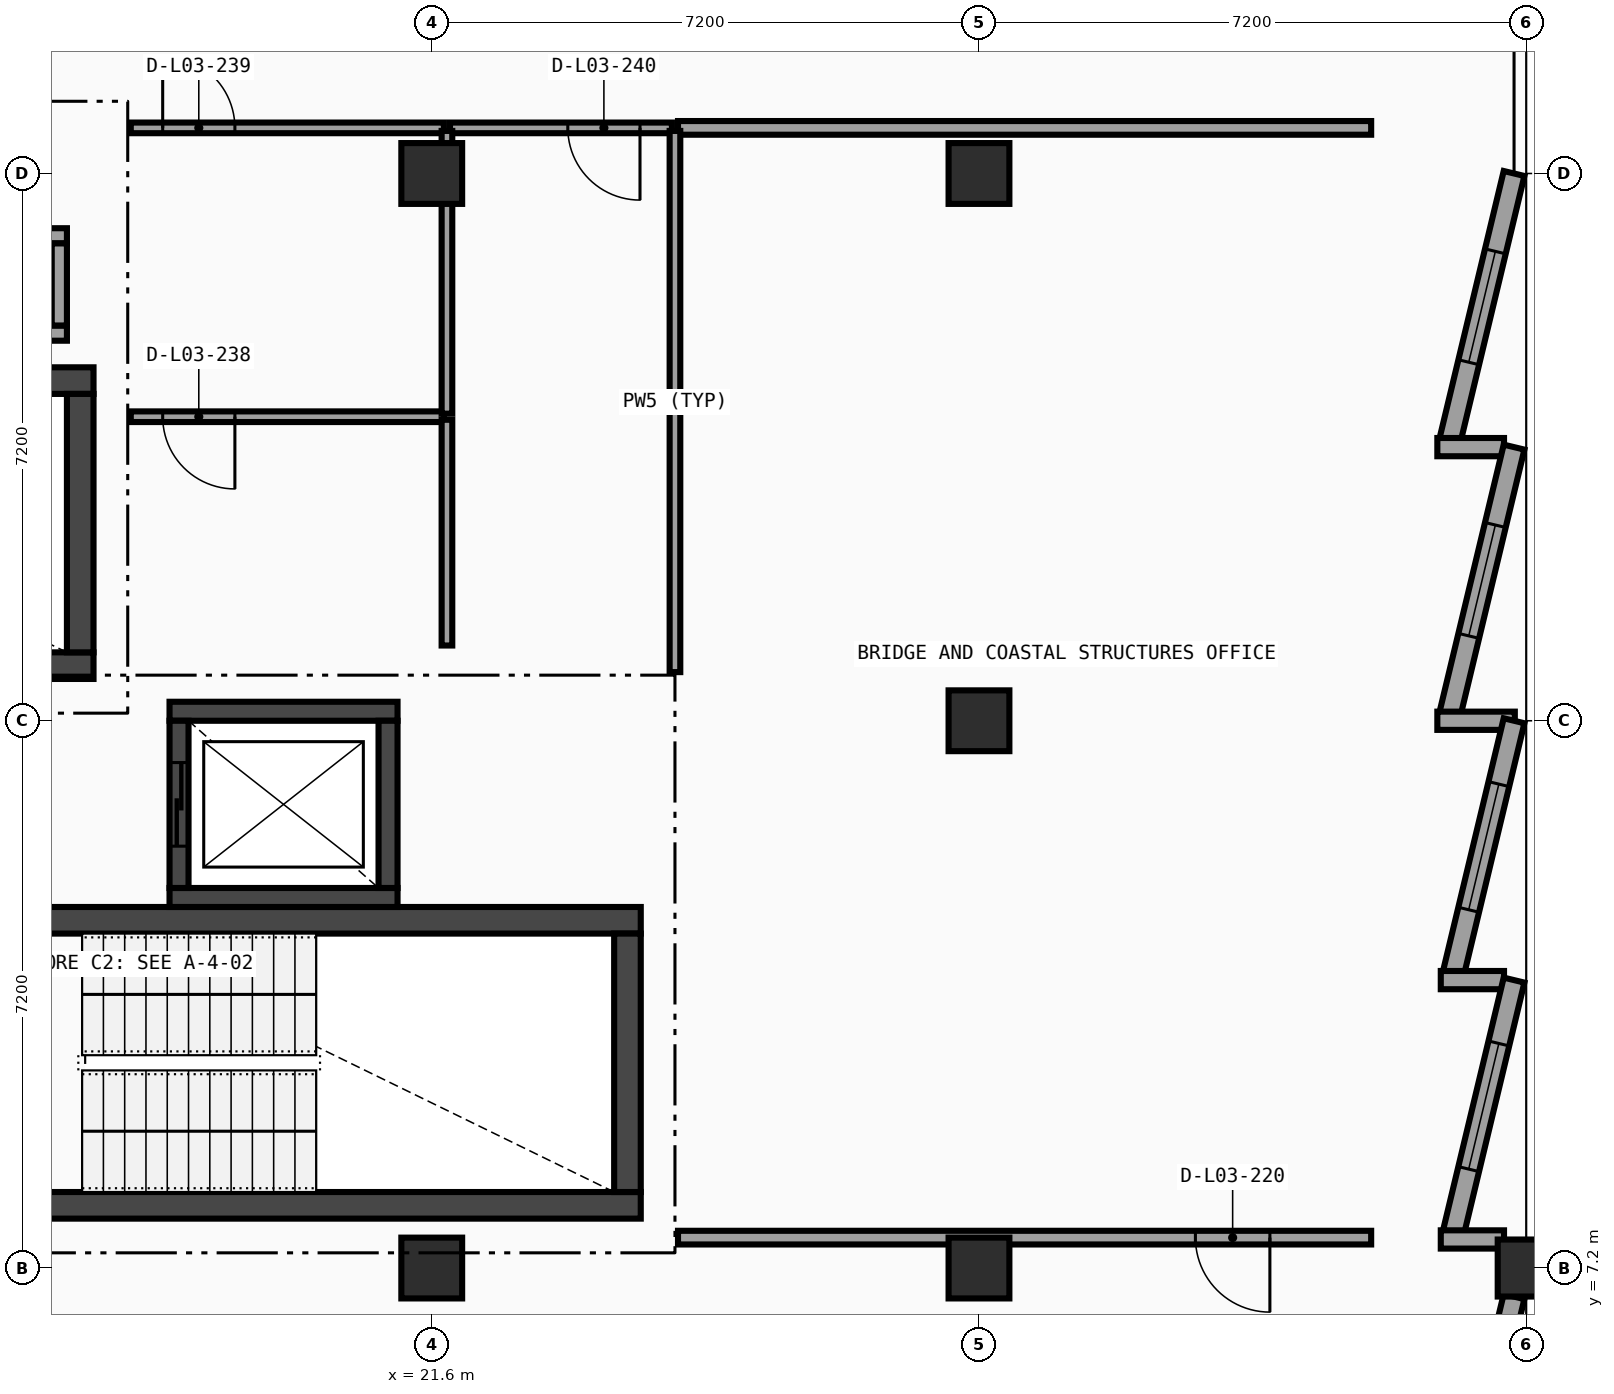
"""IFC4 building model, lengths in metres.
Left out: names, types, materials, properties, quantities, classifications, styles, units other than length and angle.
Written with IfcOpenShell. Run it as: python <this file> out.ifc"""

import sys

from ifc_helpers import new_model, si_unit, direction, frame, frame_2d, origin, origin_2d, place, context, subcontext, project, spatial, rectangle, extrude, element, fill, save


model = new_model("IFC4")
c1 = context("Model", 3, precision=1e-05, world=origin(), true_north=direction((0.0, 1.0)))
c2 = subcontext(c1, "Body", "Model", "MODEL_VIEW")
j1 = project(units=[si_unit("LENGTHUNIT", "METRE"), si_unit("PLANEANGLEUNIT", "RADIAN")], contexts=[c1])
p1 = place(None, origin())
s1 = spatial("IfcSite", under=j1, at=p1, CompositionType="ELEMENT")
p2 = place(p1, origin())
s2 = spatial("IfcBuilding", under=s1, at=p2, CompositionType="ELEMENT")
p3 = place(p2, frame((0.0, 0.0, 14.7)))
s3 = spatial("IfcBuildingStorey", under=s2, at=p3, CompositionType="ELEMENT", Elevation=14.7)
for number, where, z_axis, x_axis in (
    (1, (21.6, 7.2, 0.0), (0.0, 0.0, 1.0), (1.0, 0.0, 0.0)),
    (2, (21.6, 21.6, 0.0), (0.0, 0.0, 1.0), (1.0, 0.0, 0.0)),
    (3, (28.8, 7.2, 0.0), (0.0, 0.0, 1.0), (1.0, 0.0, 0.0)),
    (4, (28.8, 14.4, 0.0), (0.0, 0.0, 1.0), (1.0, 0.0, 0.0)),
    (5, (28.8, 21.6, 0.0), (0.0, 0.0, 1.0), (1.0, 0.0, 0.0)),
):
    element("IfcColumn", number, at=place(p3, frame(where, z_axis=z_axis, x_axis=x_axis)), inside=s3, PredefinedType="COLUMN", context=c2, shape_type="SweptSolid", body=[
        extrude(rectangle(XDim=0.8, YDim=0.8, at=origin_2d()), origin(), (0.0, 0.0, 1.0), 4.2),
    ])
p4 = place(p3, frame((36.0, 7.2, 0.0), z_axis=(0.0, 0.0, 1.0), x_axis=(1.0, 0.0, 0.0)))
e6 = element("IfcColumn", 6, at=p4, inside=s3, PredefinedType="COLUMN", context=c2, shape_type="SweptSolid", body=[
    extrude(rectangle(XDim=0.75, YDim=0.75, at=origin_2d()), origin(), (0.0, 0.0, 1.0), 4.2),
])
p5 = place(p3, frame((35.84, 21.6, 0.0), z_axis=(0.0, 0.0, 1.0), x_axis=(-0.233480453725, -0.972361495396, 0.0)))
e7 = element("IfcWall", 7, at=p5, inside=s3, PredefinedType="SOLIDWALL", context=c2, shape_type="SweptSolid", body=[
    extrude(rectangle(XDim=3.607, YDim=0.28, at=frame_2d((1.804, 0.0))), origin(), (0.0, 0.0, 1.0), 3.95),
])
p6 = place(p5, frame((1.054, 0.0, 0.8)))
e8 = element("IfcOpeningElement", 8, at=p6, cuts=e7, PredefinedType="OPENING", context=c2, shape_type="SweptSolid", body=[
    extrude(rectangle(XDim=1.5, YDim=1.7, at=frame_2d((0.75, 0.85))), frame((0.0, 0.15, 0.0), z_axis=(0.0, -1.0, 0.0), x_axis=(1.0, 0.0, 0.0)), (0.0, 0.0, 1.0), 0.3),
])
p7 = place(p3, frame((34.831, 18.0, 0.0), z_axis=(0.0, 0.0, 1.0), x_axis=(1.0, 0.0, 0.0)))
e9 = element("IfcWall", 9, at=p7, inside=s3, PredefinedType="SOLIDWALL", context=c2, shape_type="SweptSolid", body=[
    extrude(rectangle(XDim=0.877, YDim=0.24, at=frame_2d((0.438, 0.0))), origin(), (0.0, 0.0, 1.0), 3.95),
])
p8 = place(p3, frame((35.84, 18.0, 0.0), z_axis=(0.0, 0.0, 1.0), x_axis=(-0.233495818898, -0.972357805829, 0.0)))
e10 = element("IfcWall", 10, at=p8, inside=s3, PredefinedType="SOLIDWALL", context=c2, shape_type="SweptSolid", body=[
    extrude(rectangle(XDim=3.607, YDim=0.28, at=frame_2d((1.804, 0.0))), origin(), (0.0, 0.0, 1.0), 3.95),
])
p9 = place(p8, frame((1.054, 0.0, 0.8)))
e11 = element("IfcOpeningElement", 11, at=p9, cuts=e10, PredefinedType="OPENING", context=c2, shape_type="SweptSolid", body=[
    extrude(rectangle(XDim=1.5, YDim=1.7, at=frame_2d((0.75, 0.85))), frame((0.0, 0.15, 0.0), z_axis=(0.0, -1.0, 0.0), x_axis=(1.0, 0.0, 0.0)), (0.0, 0.0, 1.0), 0.3),
])
p10 = place(p3, frame((34.831, 14.4, 0.0), z_axis=(0.0, 0.0, 1.0), x_axis=(1.0, 0.0, 0.0)))
e12 = element("IfcWall", 12, at=p10, inside=s3, PredefinedType="SOLIDWALL", context=c2, shape_type="SweptSolid", body=[
    extrude(rectangle(XDim=1.019, YDim=0.24, at=frame_2d((0.51, 0.0))), origin(), (0.0, 0.0, 1.0), 3.95),
])
p11 = place(p3, frame((35.84, 14.4, 0.0), z_axis=(0.0, 0.0, 1.0), x_axis=(-0.23342163795, -0.972375616178, 0.0)))
e13 = element("IfcWall", 13, at=p11, inside=s3, PredefinedType="SOLIDWALL", context=c2, shape_type="SweptSolid", body=[
    extrude(rectangle(XDim=3.414, YDim=0.28, at=frame_2d((1.707, 0.0))), origin(), (0.0, 0.0, 1.0), 3.95),
])
p12 = place(p11, frame((0.857, 0.0, 0.8)))
e14 = element("IfcOpeningElement", 14, at=p12, cuts=e13, PredefinedType="OPENING", context=c2, shape_type="SweptSolid", body=[
    extrude(rectangle(XDim=1.7, YDim=1.85, at=frame_2d((0.85, 0.925))), frame((0.0, 0.15, 0.0), z_axis=(0.0, -1.0, 0.0), x_axis=(1.0, 0.0, 0.0)), (0.0, 0.0, 1.0), 0.3),
])
p13 = place(p3, frame((34.876, 10.988, 0.0), z_axis=(0.0, 0.0, 1.0), x_axis=(1.0, 0.0, 0.0)))
e15 = element("IfcWall", 15, at=p13, inside=s3, PredefinedType="SOLIDWALL", context=c2, shape_type="SweptSolid", body=[
    extrude(rectangle(XDim=0.832, YDim=0.24, at=frame_2d((0.416, 0.0))), origin(), (0.0, 0.0, 1.0), 3.95),
])
p14 = place(p3, frame((35.84, 10.988, 0.0), z_axis=(0.0, 0.0, 1.0), x_axis=(-0.23342163795, -0.972375616178, 0.0)))
e16 = element("IfcWall", 16, at=p14, inside=s3, PredefinedType="SOLIDWALL", context=c2, shape_type="SweptSolid", body=[
    extrude(rectangle(XDim=3.414, YDim=0.28, at=frame_2d((1.707, 0.0))), origin(), (0.0, 0.0, 1.0), 3.95),
])
p15 = place(p14, frame((0.857, 0.0, 0.8)))
e17 = element("IfcOpeningElement", 17, at=p15, cuts=e16, PredefinedType="OPENING", context=c2, shape_type="SweptSolid", body=[
    extrude(rectangle(XDim=1.7, YDim=1.85, at=frame_2d((0.85, 0.925))), frame((0.0, 0.15, 0.0), z_axis=(0.0, -1.0, 0.0), x_axis=(1.0, 0.0, 0.0)), (0.0, 0.0, 1.0), 0.3),
])
p16 = place(p3, frame((34.876, 7.576, 0.0), z_axis=(0.0, 0.0, 1.0), x_axis=(1.0, 0.0, 0.0)))
e18 = element("IfcWall", 18, at=p16, inside=s3, PredefinedType="SOLIDWALL", context=c2, shape_type="SweptSolid", body=[
    extrude(rectangle(XDim=0.832, YDim=0.24, at=frame_2d((0.416, 0.0))), origin(), (0.0, 0.0, 1.0), 3.95),
])
p17 = place(p3, frame((35.84, 6.824, 0.0), z_axis=(0.0, 0.0, 1.0), x_axis=(-0.233451302002, -0.972368494756, 0.0)))
e19 = element("IfcWall", 19, at=p17, inside=s3, PredefinedType="SOLIDWALL", context=c2, shape_type="SweptSolid", body=[
    extrude(rectangle(XDim=3.064, YDim=0.28, at=frame_2d((1.532, 0.0))), origin(), (0.0, 0.0, 1.0), 3.366),
])
p18 = place(p17, frame((0.682, 0.0, 0.8)))
e20 = element("IfcOpeningElement", 20, at=p18, cuts=e19, PredefinedType="OPENING", context=c2, shape_type="SweptSolid", body=[
    extrude(rectangle(XDim=1.7, YDim=1.85, at=frame_2d((0.85, 0.925))), frame((0.0, 0.15, 0.0), z_axis=(0.0, -1.0, 0.0), x_axis=(1.0, 0.0, 0.0)), (0.0, 0.0, 1.0), 0.3),
])
for number, where, z_axis, x_axis in (
    (21, (7.85, 15.125, 0.0), (0.0, 0.0, 1.0), (1.0, 0.0, 0.0)),
    (22, (17.15, 18.875, 0.0), (0.0, 0.0, 1.0), (-1.0, 0.0, 0.0)),
):
    element("IfcWall", number, at=place(p3, frame(where, z_axis=z_axis, x_axis=x_axis)), inside=s3, PredefinedType="SHEAR", context=c2, shape_type="SweptSolid", body=[
        extrude(rectangle(XDim=9.3, YDim=0.35, at=frame_2d((4.65, 0.0))), origin(), (0.0, 0.0, 1.0), 3.95),
    ])
p19 = place(p3, frame((16.975, 15.3, 0.0), z_axis=(0.0, 0.0, 1.0), x_axis=(0.0, 1.0, 0.0)))
e23 = element("IfcWall", 23, at=p19, inside=s3, PredefinedType="SHEAR", context=c2, shape_type="SweptSolid", body=[
    extrude(rectangle(XDim=3.4, YDim=0.35, at=frame_2d((1.7, 0.0))), origin(), (0.0, 0.0, 1.0), 3.95),
])
for number, where, z_axis, x_axis in (
    (24, (15.05, 8.025, 0.0), (0.0, 0.0, 1.0), (1.0, 0.0, 0.0)),
    (25, (24.35, 11.775, 0.0), (0.0, 0.0, 1.0), (-1.0, 0.0, 0.0)),
):
    element("IfcWall", number, at=place(p3, frame(where, z_axis=z_axis, x_axis=x_axis)), inside=s3, PredefinedType="SHEAR", context=c2, shape_type="SweptSolid", body=[
        extrude(rectangle(XDim=9.3, YDim=0.35, at=frame_2d((4.65, 0.0))), origin(), (0.0, 0.0, 1.0), 3.95),
    ])
p20 = place(p3, frame((24.175, 8.2, 0.0), z_axis=(0.0, 0.0, 1.0), x_axis=(0.0, 1.0, 0.0)))
e26 = element("IfcWall", 26, at=p20, inside=s3, PredefinedType="SHEAR", context=c2, shape_type="SweptSolid", body=[
    extrude(rectangle(XDim=3.4, YDim=0.35, at=frame_2d((1.7, 0.0))), origin(), (0.0, 0.0, 1.0), 3.95),
])
for number, where, z_axis, x_axis in (
    (27, (18.15, 12.075, 0.0), (0.0, 0.0, 1.0), (1.0, 0.0, 0.0)),
    (28, (21.15, 14.525, 0.0), (0.0, 0.0, 1.0), (-1.0, 0.0, 0.0)),
):
    element("IfcWall", number, at=place(p3, frame(where, z_axis=z_axis, x_axis=x_axis)), inside=s3, PredefinedType="SHEAR", context=c2, shape_type="SweptSolid", body=[
        extrude(rectangle(XDim=3.0, YDim=0.25, at=frame_2d((1.5, 0.0))), origin(), (0.0, 0.0, 1.0), 3.95),
    ])
p21 = place(p3, frame((18.275, 14.4, 0.0), z_axis=(0.0, 0.0, 1.0), x_axis=(0.0, -1.0, 0.0)))
e29 = element("IfcWall", 29, at=p21, inside=s3, PredefinedType="SHEAR", context=c2, shape_type="SweptSolid", body=[
    extrude(rectangle(XDim=2.2, YDim=0.25, at=frame_2d((1.1, 0.0))), origin(), (0.0, 0.0, 1.0), 3.95),
])
p22 = place(p21, frame((0.55, 0.0, 0.0)))
e30 = element("IfcOpeningElement", 30, at=p22, cuts=e29, PredefinedType="OPENING", context=c2, shape_type="SweptSolid", body=[
    extrude(rectangle(XDim=1.1, YDim=2.1, at=frame_2d((0.55, 1.05))), frame((0.0, 0.135, 0.0), z_axis=(0.0, -1.0, 0.0), x_axis=(1.0, 0.0, 0.0)), (0.0, 0.0, 1.0), 0.27),
])
p23 = place(p3, frame((21.025, 12.2, 0.0), z_axis=(0.0, 0.0, 1.0), x_axis=(0.0, 1.0, 0.0)))
e31 = element("IfcWall", 31, at=p23, inside=s3, PredefinedType="SHEAR", context=c2, shape_type="SweptSolid", body=[
    extrude(rectangle(XDim=2.2, YDim=0.25, at=frame_2d((1.1, 0.0))), origin(), (0.0, 0.0, 1.0), 3.95),
])
for number, where, z_axis, x_axis in (
    (32, (15.2, 19.5, 0.0), (0.0, 0.0, 1.0), (1.0, 0.0, 0.0)),
    (33, (16.8, 20.78, 0.0), (0.0, 0.0, 1.0), (-1.0, 0.0, 0.0)),
):
    element("IfcWall", number, at=place(p3, frame(where, z_axis=z_axis, x_axis=x_axis)), inside=s3, PredefinedType="SOLIDWALL", context=c2, shape_type="SweptSolid", body=[
        extrude(rectangle(XDim=1.6, YDim=0.2, at=frame_2d((0.8, 0.0))), origin(), (0.0, 0.0, 1.0), 3.95),
    ])
p24 = place(p3, frame((16.7, 19.6, 0.0), z_axis=(0.0, 0.0, 1.0), x_axis=(0.0, 1.0, 0.0)))
e34 = element("IfcWall", 34, at=p24, inside=s3, PredefinedType="SOLIDWALL", context=c2, shape_type="SweptSolid", body=[
    extrude(rectangle(XDim=1.08, YDim=0.2, at=frame_2d((0.54, 0.0))), origin(), (0.0, 0.0, 1.0), 3.95),
])
p25 = place(p3, frame((24.84, 22.2, 0.0), z_axis=(0.0, 0.0, 1.0), x_axis=(1.0, 0.0, 0.0)))
e35 = element("IfcWall", 35, at=p25, inside=s3, PredefinedType="PARTITIONING", context=c2, shape_type="SweptSolid", body=[
    extrude(rectangle(XDim=9.12, YDim=0.18, at=frame_2d((4.56, 0.0))), origin(), (0.0, 0.0, 1.0), 3.352),
])
p26 = place(p3, frame((17.64, 22.2, 0.0), z_axis=(0.0, 0.0, 1.0), x_axis=(1.0, 0.0, 0.0)))
e36 = element("IfcWall", 36, at=p26, inside=s3, PredefinedType="PARTITIONING", context=c2, shape_type="SweptSolid", body=[
    extrude(rectangle(XDim=4.12, YDim=0.14, at=frame_2d((2.06, 0.0))), origin(), (0.0, 0.0, 1.0), 3.352),
])
p27 = place(p26, frame((0.42, 0.0, 0.0)))
e37 = element("IfcOpeningElement", 37, at=p27, cuts=e36, PredefinedType="OPENING", context=c2, shape_type="SweptSolid", body=[
    extrude(rectangle(XDim=0.95, YDim=2.08, at=frame_2d((0.475, 1.04))), frame((0.0, 0.08, 0.0), z_axis=(0.0, -1.0, 0.0), x_axis=(1.0, 0.0, 0.0)), (0.0, 0.0, 1.0), 0.16),
])
p28 = place(p3, frame((21.84, 22.2, 0.0), z_axis=(0.0, 0.0, 1.0), x_axis=(1.0, 0.0, 0.0)))
e38 = element("IfcWall", 38, at=p28, inside=s3, PredefinedType="PARTITIONING", context=c2, shape_type="SweptSolid", body=[
    extrude(rectangle(XDim=2.92, YDim=0.14, at=frame_2d((1.46, 0.0))), origin(), (0.0, 0.0, 1.0), 3.95),
])
p29 = place(p28, frame((1.55, 0.0, 0.0)))
e39 = element("IfcOpeningElement", 39, at=p29, cuts=e38, PredefinedType="OPENING", context=c2, shape_type="SweptSolid", body=[
    extrude(rectangle(XDim=0.95, YDim=2.08, at=frame_2d((0.475, 1.04))), frame((0.0, 0.08, 0.0), z_axis=(0.0, -1.0, 0.0), x_axis=(1.0, 0.0, 0.0)), (0.0, 0.0, 1.0), 0.16),
])
p30 = place(p3, frame((24.84, 7.6, 0.0), z_axis=(0.0, 0.0, 1.0), x_axis=(1.0, 0.0, 0.0)))
e40 = element("IfcWall", 40, at=p30, inside=s3, PredefinedType="PARTITIONING", context=c2, shape_type="SweptSolid", body=[
    extrude(rectangle(XDim=9.12, YDim=0.18, at=frame_2d((4.56, 0.0))), origin(), (0.0, 0.0, 1.0), 3.352),
])
p31 = place(p30, frame((6.808, 0.0, 0.0)))
e41 = element("IfcOpeningElement", 41, at=p31, cuts=e40, PredefinedType="OPENING", context=c2, shape_type="SweptSolid", body=[
    extrude(rectangle(XDim=0.98, YDim=2.1, at=frame_2d((0.49, 1.05))), frame((0.0, 0.1, 0.0), z_axis=(0.0, -1.0, 0.0), x_axis=(1.0, 0.0, 0.0)), (0.0, 0.0, 1.0), 0.2),
])
p32 = place(p3, frame((24.8, 15.04, 0.0), z_axis=(0.0, 0.0, 1.0), x_axis=(0.0, 1.0, 0.0)))
e42 = element("IfcWall", 42, at=p32, inside=s3, PredefinedType="PARTITIONING", context=c2, shape_type="SweptSolid", body=[
    extrude(rectangle(XDim=7.12, YDim=0.14, at=frame_2d((3.56, 0.0))), origin(), (0.0, 0.0, 1.0), 3.352),
])
p33 = place(p3, frame((17.64, 18.4, 0.0), z_axis=(0.0, 0.0, 1.0), x_axis=(1.0, 0.0, 0.0)))
e43 = element("IfcWall", 43, at=p33, inside=s3, PredefinedType="PARTITIONING", context=c2, shape_type="SweptSolid", body=[
    extrude(rectangle(XDim=4.12, YDim=0.14, at=frame_2d((2.06, 0.0))), origin(), (0.0, 0.0, 1.0), 3.95),
])
p34 = place(p33, frame((0.42, 0.0, 0.0)))
e44 = element("IfcOpeningElement", 44, at=p34, cuts=e43, PredefinedType="OPENING", context=c2, shape_type="SweptSolid", body=[
    extrude(rectangle(XDim=0.95, YDim=2.08, at=frame_2d((0.475, 1.04))), frame((0.0, 0.08, 0.0), z_axis=(0.0, -1.0, 0.0), x_axis=(1.0, 0.0, 0.0)), (0.0, 0.0, 1.0), 0.16),
])
p35 = place(p3, frame((21.8, 15.39, 0.0), z_axis=(0.0, 0.0, 1.0), x_axis=(0.0, 1.0, 0.0)))
e45 = element("IfcWall", 45, at=p35, inside=s3, PredefinedType="PARTITIONING", context=c2, shape_type="SweptSolid", body=[
    extrude(rectangle(XDim=2.97, YDim=0.14, at=frame_2d((1.485, 0.0))), origin(), (0.0, 0.0, 1.0), 3.95),
])
p36 = place(p3, frame((21.8, 18.44, 0.0), z_axis=(0.0, 0.0, 1.0), x_axis=(0.0, 1.0, 0.0)))
e46 = element("IfcWall", 46, at=p36, inside=s3, PredefinedType="PARTITIONING", context=c2, shape_type="SweptSolid", body=[
    extrude(rectangle(XDim=3.72, YDim=0.14, at=frame_2d((1.86, 0.0))), origin(), (0.0, 0.0, 1.0), 3.352),
])
p37 = place(p6, origin())
e47 = element("IfcWindow", 47, at=p37, inside=s3, PartitioningType="SINGLE_PANEL", PredefinedType="WINDOW", context=c2, shape_type="SweptSolid", body=[
    extrude(rectangle(XDim=1.5, YDim=1.7, at=frame_2d((0.75, 0.85))), frame((0.0, 0.03, 0.0), z_axis=(0.0, -1.0, 0.0), x_axis=(1.0, 0.0, 0.0)), (0.0, 0.0, 1.0), 0.06),
])
fill(e8, e47)
p38 = place(p9, origin())
e48 = element("IfcWindow", 48, at=p38, inside=s3, PartitioningType="SINGLE_PANEL", PredefinedType="WINDOW", context=c2, shape_type="SweptSolid", body=[
    extrude(rectangle(XDim=1.5, YDim=1.7, at=frame_2d((0.75, 0.85))), frame((0.0, 0.03, 0.0), z_axis=(0.0, -1.0, 0.0), x_axis=(1.0, 0.0, 0.0)), (0.0, 0.0, 1.0), 0.06),
])
fill(e11, e48)
p39 = place(p12, origin())
e49 = element("IfcWindow", 49, at=p39, inside=s3, PartitioningType="SINGLE_PANEL", PredefinedType="WINDOW", context=c2, shape_type="SweptSolid", body=[
    extrude(rectangle(XDim=1.7, YDim=1.85, at=frame_2d((0.85, 0.925))), frame((0.0, 0.03, 0.0), z_axis=(0.0, -1.0, 0.0), x_axis=(1.0, 0.0, 0.0)), (0.0, 0.0, 1.0), 0.06),
])
fill(e14, e49)
p40 = place(p15, origin())
e50 = element("IfcWindow", 50, at=p40, inside=s3, PartitioningType="SINGLE_PANEL", PredefinedType="WINDOW", context=c2, shape_type="SweptSolid", body=[
    extrude(rectangle(XDim=1.7, YDim=1.85, at=frame_2d((0.85, 0.925))), frame((0.0, 0.03, 0.0), z_axis=(0.0, -1.0, 0.0), x_axis=(1.0, 0.0, 0.0)), (0.0, 0.0, 1.0), 0.06),
])
fill(e17, e50)
p41 = place(p22, origin())
e51 = element("IfcDoor", 51, at=p41, inside=s3, OperationType="SLIDING_TO_LEFT", PredefinedType="DOOR", context=c2, shape_type="SweptSolid", body=[
    extrude(rectangle(XDim=1.1, YDim=2.1, at=frame_2d((0.55, 1.05))), frame((0.0, 0.025, 0.0), z_axis=(0.0, -1.0, 0.0), x_axis=(1.0, 0.0, 0.0)), (0.0, 0.0, 1.0), 0.05),
])
fill(e30, e51)
p42 = place(p31, origin())
e52 = element("IfcDoor", 52, at=p42, inside=s3, OperationType="SINGLE_SWING_RIGHT", PredefinedType="DOOR", context=c2, shape_type="SweptSolid", body=[
    extrude(rectangle(XDim=0.98, YDim=2.1, at=frame_2d((0.49, 1.05))), frame((0.0, 0.025, 0.0), z_axis=(0.0, -1.0, 0.0), x_axis=(1.0, 0.0, 0.0)), (0.0, 0.0, 1.0), 0.05),
])
fill(e41, e52)
p43 = place(p34, origin())
e53 = element("IfcDoor", 53, at=p43, inside=s3, OperationType="SINGLE_SWING_RIGHT", PredefinedType="DOOR", context=c2, shape_type="SweptSolid", body=[
    extrude(rectangle(XDim=0.95, YDim=2.08, at=frame_2d((0.475, 1.04))), frame((0.0, 0.025, 0.0), z_axis=(0.0, -1.0, 0.0), x_axis=(1.0, 0.0, 0.0)), (0.0, 0.0, 1.0), 0.05),
])
fill(e44, e53)
p44 = place(p27, origin())
e54 = element("IfcDoor", 54, at=p44, inside=s3, OperationType="SINGLE_SWING_LEFT", PredefinedType="DOOR", context=c2, shape_type="SweptSolid", body=[
    extrude(rectangle(XDim=0.95, YDim=2.08, at=frame_2d((0.475, 1.04))), frame((0.0, 0.025, 0.0), z_axis=(0.0, -1.0, 0.0), x_axis=(1.0, 0.0, 0.0)), (0.0, 0.0, 1.0), 0.05),
])
fill(e37, e54)
p45 = place(p29, origin())
e55 = element("IfcDoor", 55, at=p45, inside=s3, OperationType="SINGLE_SWING_RIGHT", PredefinedType="DOOR", context=c2, shape_type="SweptSolid", body=[
    extrude(rectangle(XDim=0.95, YDim=2.08, at=frame_2d((0.475, 1.04))), frame((0.0, 0.025, 0.0), z_axis=(0.0, -1.0, 0.0), x_axis=(1.0, 0.0, 0.0)), (0.0, 0.0, 1.0), 0.05),
])
fill(e39, e55)
save(model, sys.argv[1])
